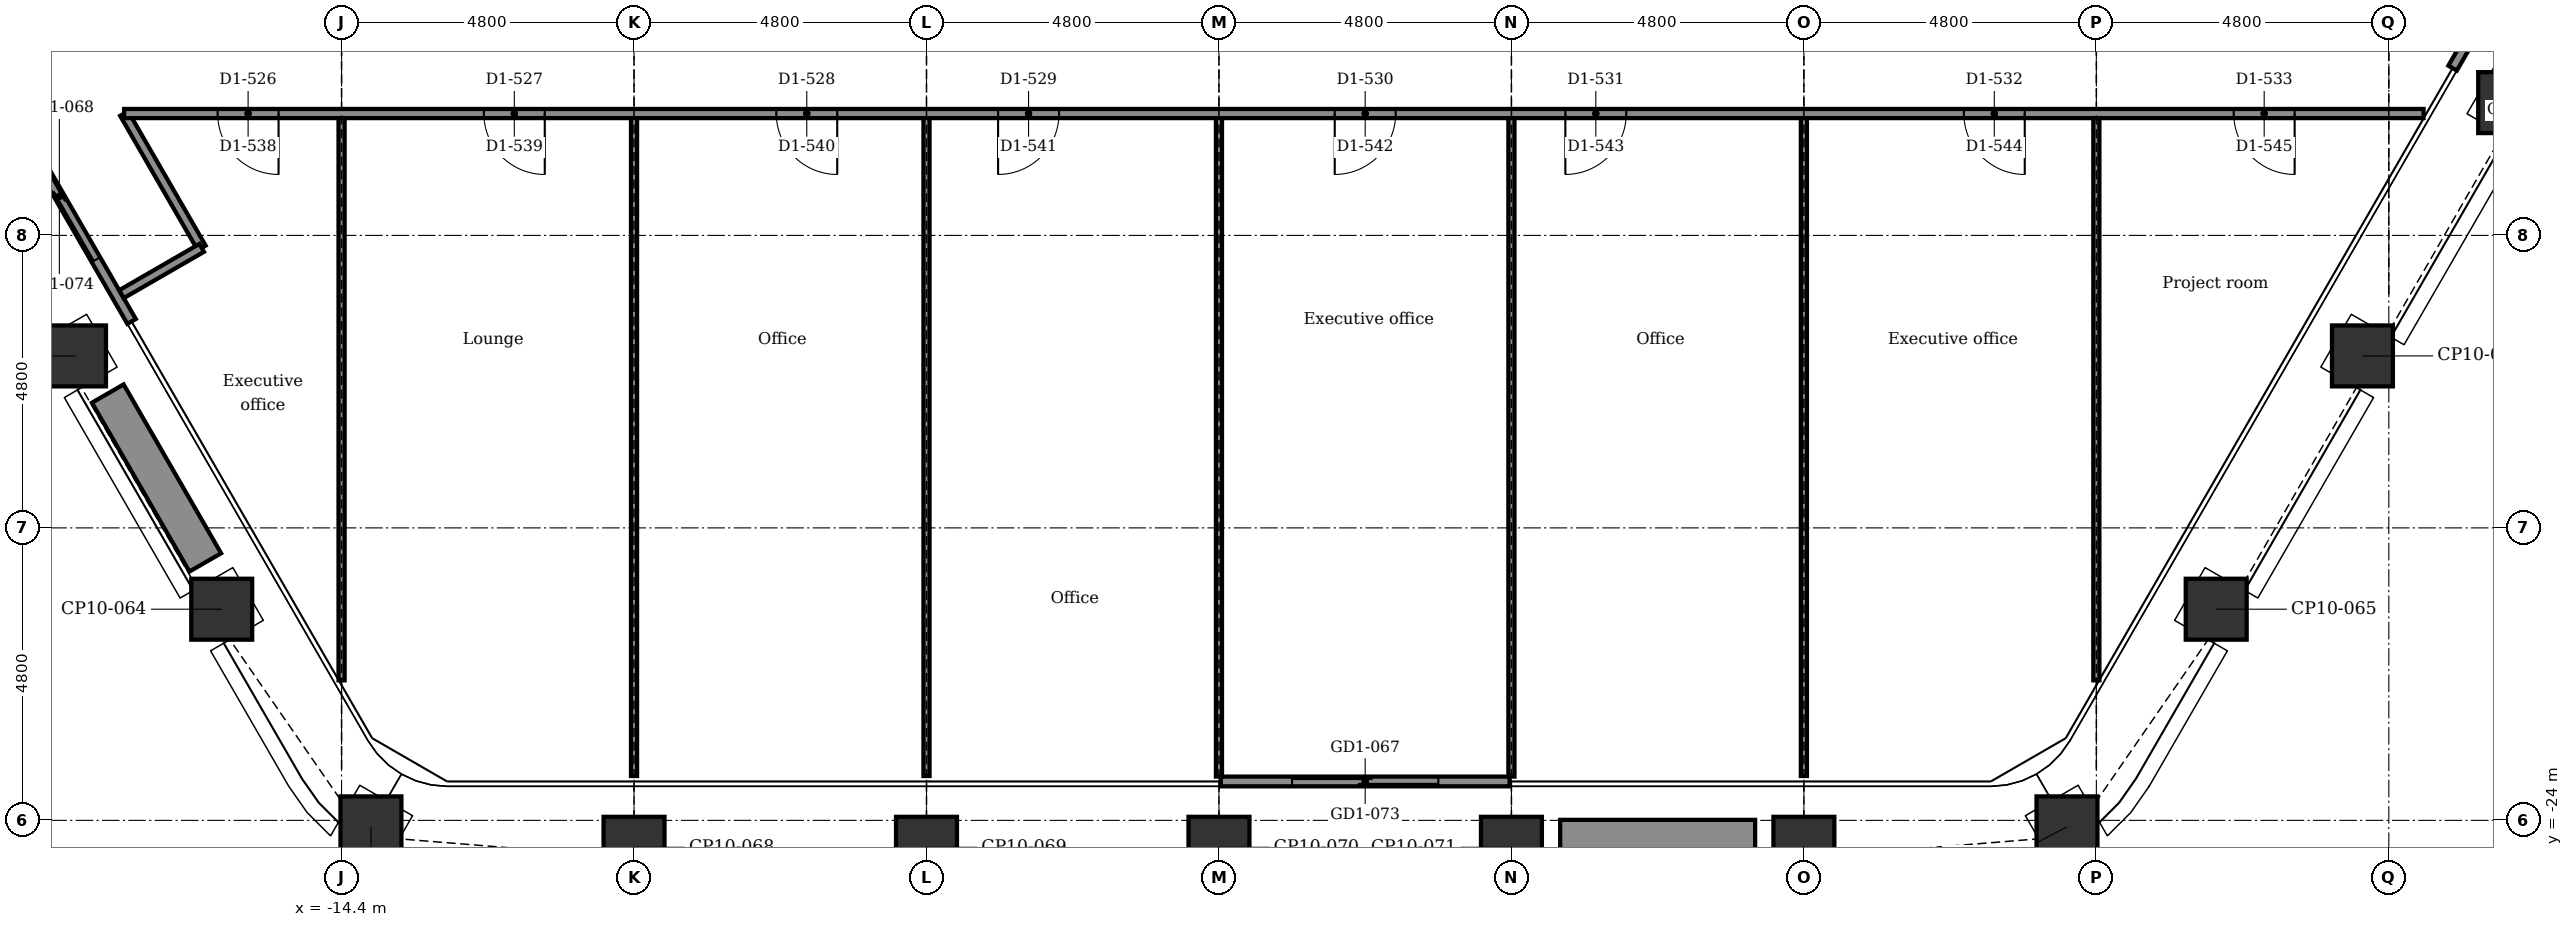
"""IFC4 building model, lengths in metres.
Left out: names, types, materials, properties, quantities, classifications, styles, units other than length and angle.
Written with IfcOpenShell. Run it as: python <this file> out.ifc"""

import sys

from ifc_helpers import new_model, si_unit, direction, frame, frame_2d, origin, origin_2d, place, context, subcontext, project, spatial, rectangle, extrude, element, fill, save


model = new_model("IFC4")
c1 = context("Model", 3, precision=1e-05, world=origin(), true_north=direction((0.0, 1.0)))
c2 = subcontext(c1, "Body", "Model", "MODEL_VIEW")
j1 = project(units=[si_unit("LENGTHUNIT", "METRE"), si_unit("PLANEANGLEUNIT", "RADIAN")], contexts=[c1])
p1 = place(None, origin())
s1 = spatial("IfcSite", under=j1, at=p1, CompositionType="ELEMENT")
p2 = place(p1, origin())
s2 = spatial("IfcBuilding", under=s1, at=p2, CompositionType="ELEMENT")
p3 = place(p2, frame((0.0, 0.0, 185.6)))
s3 = spatial("IfcBuildingStorey", under=s2, at=p3, CompositionType="ELEMENT", Elevation=185.6)
for number, where, z_axis, x_axis in (
    (1, (21.167, -12.221, -0.15), (0.0, 0.0, 1.0), (0.5, 0.866, 0.0)),
    (2, (18.767, -16.378, -0.15), (0.0, 0.0, 1.0), (0.5, 0.866, 0.0)),
    (3, (16.367, -20.535, -0.15), (0.0, 0.0, 1.0), (0.5, 0.866, 0.0)),
    (4, (13.918, -24.107, -0.15), (0.0, 0.0, 1.0), (0.866, 0.5, 0.0)),
    (5, (9.6, -24.442, -0.15), (0.0, 0.0, 1.0), (1.0, 0.0, 0.0)),
    (6, (4.8, -24.442, -0.15), (0.0, 0.0, 1.0), (1.0, 0.0, 0.0)),
    (7, (0.0, -24.442, -0.15), (0.0, 0.0, 1.0), (1.0, 0.0, 0.0)),
    (8, (-4.8, -24.442, -0.15), (0.0, 0.0, 1.0), (1.0, 0.0, 0.0)),
    (9, (-9.6, -24.442, -0.15), (0.0, 0.0, 1.0), (1.0, 0.0, 0.0)),
    (10, (-13.918, -24.107, -0.15), (0.0, 0.0, 1.0), (0.5, 0.866, 0.0)),
    (11, (-16.367, -20.535, -0.15), (0.0, 0.0, 1.0), (0.866, 0.5, 0.0)),
    (12, (-18.767, -16.378, -0.15), (0.0, 0.0, 1.0), (0.866, 0.5, 0.0)),
):
    element("IfcColumn", number, at=place(p3, frame(where, z_axis=z_axis, x_axis=x_axis)), inside=s3, PredefinedType="COLUMN", context=c2, shape_type="SweptSolid", body=[
        extrude(rectangle(XDim=1.0, YDim=1.0, at=origin_2d()), origin(), (0.0, 0.0, 1.0), 3.9),
    ])
p4 = place(p3, frame((22.617, -7.55, 0.0), z_axis=(0.0, 0.0, 1.0), x_axis=(-0.5000167099, -0.866015756104, 0.0)))
e13 = element("IfcWall", 13, at=p4, inside=s3, PredefinedType="PARTITIONING", context=c2, shape_type="SweptSolid", body=[
    extrude(rectangle(XDim=4.74, YDim=0.16, at=frame_2d((2.37, 0.0))), origin(), (0.0, 0.0, 1.0), 3.75),
])
p5 = place(p4, frame((1.17, 0.0, 0.0)))
e14 = element("IfcOpeningElement", 14, at=p5, cuts=e13, PredefinedType="OPENING", context=c2, shape_type="SweptSolid", body=[
    extrude(rectangle(XDim=2.4, YDim=2.4, at=frame_2d((1.2, 1.2))), frame((0.0, 0.09, 0.0), z_axis=(0.0, -1.0, 0.0), x_axis=(1.0, 0.0, 0.0)), (0.0, 0.0, 1.0), 0.18),
])
p6 = place(p3, frame((4.77, -23.362, 0.0), z_axis=(0.0, 0.0, 1.0), x_axis=(-1.0, 0.0, 0.0)))
e15 = element("IfcWall", 15, at=p6, inside=s3, PredefinedType="PARTITIONING", context=c2, shape_type="SweptSolid", body=[
    extrude(rectangle(XDim=4.74, YDim=0.16, at=frame_2d((2.37, 0.0))), origin(), (0.0, 0.0, 1.0), 3.75),
])
p7 = place(p6, frame((1.17, 0.0, 0.0)))
e16 = element("IfcOpeningElement", 16, at=p7, cuts=e15, PredefinedType="OPENING", context=c2, shape_type="SweptSolid", body=[
    extrude(rectangle(XDim=2.4, YDim=2.4, at=frame_2d((1.2, 1.2))), frame((0.0, 0.09, 0.0), z_axis=(0.0, -1.0, 0.0), x_axis=(1.0, 0.0, 0.0)), (0.0, 0.0, 1.0), 0.18),
])
p8 = place(p3, frame((-17.847, -15.812, 0.0), z_axis=(0.0, 0.0, 1.0), x_axis=(-0.5000167099, 0.866015756104, 0.0)))
e17 = element("IfcWall", 17, at=p8, inside=s3, PredefinedType="PARTITIONING", context=c2, shape_type="SweptSolid", body=[
    extrude(rectangle(XDim=4.74, YDim=0.16, at=frame_2d((2.37, 0.0))), origin(), (0.0, 0.0, 1.0), 3.75),
])
p9 = place(p8, frame((1.17, 0.0, 0.0)))
e18 = element("IfcOpeningElement", 18, at=p9, cuts=e17, PredefinedType="OPENING", context=c2, shape_type="SweptSolid", body=[
    extrude(rectangle(XDim=2.4, YDim=2.4, at=frame_2d((1.2, 1.2))), frame((0.0, 0.09, 0.0), z_axis=(0.0, -1.0, 0.0), x_axis=(1.0, 0.0, 0.0)), (0.0, 0.0, 1.0), 0.18),
])
for number, where, z_axis, x_axis in (
    (19, (8.8, -24.292, 0.0), (0.0, 0.0, 1.0), (-1.0, 0.0, 0.0)),
    (20, (-16.637, -19.767, 0.0), (0.0, 0.0, 1.0), (-0.5, 0.866, 0.0)),
):
    element("IfcWall", number, at=place(p3, frame(where, z_axis=z_axis, x_axis=x_axis)), inside=s3, PredefinedType="USERDEFINED", context=c2, shape_type="SweptSolid", body=[
        extrude(rectangle(XDim=3.2, YDim=0.6, at=frame_2d((1.6, 0.0))), origin(), (0.0, 0.0, 1.0), 0.7),
    ])
p10 = place(p3, frame((14.4, -21.701, 0.0), z_axis=(0.0, 0.0, 1.0), x_axis=(0.0, 1.0, 0.0)))
e21 = element("IfcWall", 21, at=p10, inside=s3, PredefinedType="PARTITIONING", context=c2, shape_type="SweptSolid", body=[
    extrude(rectangle(XDim=9.302, YDim=0.1, at=frame_2d((4.651, 0.0))), origin(), (0.0, 0.0, 1.0), 3.066),
])
p11 = place(p3, frame((9.6, -23.271, 0.0), z_axis=(0.0, 0.0, 1.0), x_axis=(0.0, 1.0, 0.0)))
e22 = element("IfcWall", 22, at=p11, inside=s3, PredefinedType="PARTITIONING", context=c2, shape_type="SweptSolid", body=[
    extrude(rectangle(XDim=10.872, YDim=0.1, at=frame_2d((5.436, 0.0))), origin(), (0.0, 0.0, 1.0), 3.066),
])
for number, where, z_axis, x_axis in (
    (23, (4.8, -23.281, 0.0), (0.0, 0.0, 1.0), (0.0, 1.0, 0.0)),
    (24, (0.0, -23.281, 0.0), (0.0, 0.0, 1.0), (0.0, 1.0, 0.0)),
):
    element("IfcWall", number, at=place(p3, frame(where, z_axis=z_axis, x_axis=x_axis)), inside=s3, PredefinedType="PARTITIONING", context=c2, shape_type="SweptSolid", body=[
        extrude(rectangle(XDim=10.882, YDim=0.1, at=frame_2d((5.441, 0.0))), origin(), (0.0, 0.0, 1.0), 3.066),
    ])
for number, where, z_axis, x_axis in (
    (25, (-4.8, -23.271, 0.0), (0.0, 0.0, 1.0), (0.0, 1.0, 0.0)),
    (26, (-9.6, -23.271, 0.0), (0.0, 0.0, 1.0), (0.0, 1.0, 0.0)),
):
    element("IfcWall", number, at=place(p3, frame(where, z_axis=z_axis, x_axis=x_axis)), inside=s3, PredefinedType="PARTITIONING", context=c2, shape_type="SweptSolid", body=[
        extrude(rectangle(XDim=10.872, YDim=0.1, at=frame_2d((5.436, 0.0))), origin(), (0.0, 0.0, 1.0), 3.066),
    ])
p12 = place(p3, frame((-14.4, -21.701, 0.0), z_axis=(0.0, 0.0, 1.0), x_axis=(0.0, 1.0, 0.0)))
e27 = element("IfcWall", 27, at=p12, inside=s3, PredefinedType="PARTITIONING", context=c2, shape_type="SweptSolid", body=[
    extrude(rectangle(XDim=9.302, YDim=0.1, at=frame_2d((4.651, 0.0))), origin(), (0.0, 0.0, 1.0), 3.066),
])
p13 = place(p3, frame((-17.969, -12.4, 0.0), z_axis=(0.0, 0.0, 1.0), x_axis=(0.499996383721, -0.866027491634, 0.0)))
e28 = element("IfcWall", 28, at=p13, inside=s3, PredefinedType="PARTITIONING", context=c2, shape_type="SweptSolid", body=[
    extrude(rectangle(XDim=2.546, YDim=0.15, at=frame_2d((1.273, 0.0))), origin(), (0.0, 0.0, 1.0), 3.75),
])
p14 = place(p3, frame((-18.012, -15.365, 0.0), z_axis=(0.0, 0.0, 1.0), x_axis=(0.866030456496, 0.499991248344, 0.0)))
e29 = element("IfcWall", 29, at=p14, inside=s3, PredefinedType="PARTITIONING", context=c2, shape_type="SweptSolid", body=[
    extrude(rectangle(XDim=1.52, YDim=0.15, at=frame_2d((0.76, 0.0))), origin(), (0.0, 0.0, 1.0), 3.75),
])
p15 = place(p3, frame((-17.969, -12.4, 0.0), z_axis=(0.0, 0.0, 1.0), x_axis=(1.0, 0.0, 0.0)))
e30 = element("IfcWall", 30, at=p15, inside=s3, PredefinedType="PARTITIONING", context=c2, shape_type="SweptSolid", body=[
    extrude(rectangle(XDim=37.739, YDim=0.15, at=frame_2d((18.87, 0.0))), origin(), (0.0, 0.0, 1.0), 3.75),
])
p16 = place(p15, frame((1.535, 0.0, 0.0)))
e31 = element("IfcOpeningElement", 31, at=p16, cuts=e30, PredefinedType="OPENING", context=c2, shape_type="SweptSolid", body=[
    extrude(rectangle(XDim=1.0, YDim=2.1, at=frame_2d((0.5, 1.05))), frame((0.0, 0.085, 0.0), z_axis=(0.0, -1.0, 0.0), x_axis=(1.0, 0.0, 0.0)), (0.0, 0.0, 1.0), 0.17),
])
p17 = place(p15, frame((5.904, 0.0, 0.0)))
e32 = element("IfcOpeningElement", 32, at=p17, cuts=e30, PredefinedType="OPENING", context=c2, shape_type="SweptSolid", body=[
    extrude(rectangle(XDim=1.0, YDim=2.1, at=frame_2d((0.5, 1.05))), frame((0.0, 0.085, 0.0), z_axis=(0.0, -1.0, 0.0), x_axis=(1.0, 0.0, 0.0)), (0.0, 0.0, 1.0), 0.17),
])
p18 = place(p15, frame((10.704, 0.0, 0.0)))
e33 = element("IfcOpeningElement", 33, at=p18, cuts=e30, PredefinedType="OPENING", context=c2, shape_type="SweptSolid", body=[
    extrude(rectangle(XDim=1.0, YDim=2.1, at=frame_2d((0.5, 1.05))), frame((0.0, 0.085, 0.0), z_axis=(0.0, -1.0, 0.0), x_axis=(1.0, 0.0, 0.0)), (0.0, 0.0, 1.0), 0.17),
])
p19 = place(p15, frame((14.344, 0.0, 0.0)))
e34 = element("IfcOpeningElement", 34, at=p19, cuts=e30, PredefinedType="OPENING", context=c2, shape_type="SweptSolid", body=[
    extrude(rectangle(XDim=1.0, YDim=2.1, at=frame_2d((0.5, 1.05))), frame((0.0, 0.085, 0.0), z_axis=(0.0, -1.0, 0.0), x_axis=(1.0, 0.0, 0.0)), (0.0, 0.0, 1.0), 0.17),
])
p20 = place(p15, frame((19.869, 0.0, 0.0)))
e35 = element("IfcOpeningElement", 35, at=p20, cuts=e30, PredefinedType="OPENING", context=c2, shape_type="SweptSolid", body=[
    extrude(rectangle(XDim=1.0, YDim=2.1, at=frame_2d((0.5, 1.05))), frame((0.0, 0.085, 0.0), z_axis=(0.0, -1.0, 0.0), x_axis=(1.0, 0.0, 0.0)), (0.0, 0.0, 1.0), 0.17),
])
p21 = place(p15, frame((23.654, 0.0, 0.0)))
e36 = element("IfcOpeningElement", 36, at=p21, cuts=e30, PredefinedType="OPENING", context=c2, shape_type="SweptSolid", body=[
    extrude(rectangle(XDim=1.0, YDim=2.1, at=frame_2d((0.5, 1.05))), frame((0.0, 0.085, 0.0), z_axis=(0.0, -1.0, 0.0), x_axis=(1.0, 0.0, 0.0)), (0.0, 0.0, 1.0), 0.17),
])
p22 = place(p15, frame((30.194, 0.0, 0.0)))
e37 = element("IfcOpeningElement", 37, at=p22, cuts=e30, PredefinedType="OPENING", context=c2, shape_type="SweptSolid", body=[
    extrude(rectangle(XDim=1.0, YDim=2.1, at=frame_2d((0.5, 1.05))), frame((0.0, 0.085, 0.0), z_axis=(0.0, -1.0, 0.0), x_axis=(1.0, 0.0, 0.0)), (0.0, 0.0, 1.0), 0.17),
])
p23 = place(p15, frame((34.623, 0.0, 0.0)))
e38 = element("IfcOpeningElement", 38, at=p23, cuts=e30, PredefinedType="OPENING", context=c2, shape_type="SweptSolid", body=[
    extrude(rectangle(XDim=1.0, YDim=2.1, at=frame_2d((0.5, 1.05))), frame((0.0, 0.085, 0.0), z_axis=(0.0, -1.0, 0.0), x_axis=(1.0, 0.0, 0.0)), (0.0, 0.0, 1.0), 0.17),
])
p24 = place(p7, origin())
e39 = element("IfcDoor", 39, at=p24, inside=s3, OperationType="DOUBLE_DOOR_SLIDING", PredefinedType="DOOR", context=c2, shape_type="SweptSolid", body=[
    extrude(rectangle(XDim=2.4, YDim=2.4, at=frame_2d((1.2, 1.2))), frame((0.0, 0.025, 0.0), z_axis=(0.0, -1.0, 0.0), x_axis=(1.0, 0.0, 0.0)), (0.0, 0.0, 1.0), 0.05),
])
fill(e16, e39)
p25 = place(p9, origin())
e40 = element("IfcDoor", 40, at=p25, inside=s3, OperationType="DOUBLE_DOOR_SLIDING", PredefinedType="DOOR", context=c2, shape_type="SweptSolid", body=[
    extrude(rectangle(XDim=2.4, YDim=2.4, at=frame_2d((1.2, 1.2))), frame((0.0, 0.025, 0.0), z_axis=(0.0, -1.0, 0.0), x_axis=(1.0, 0.0, 0.0)), (0.0, 0.0, 1.0), 0.05),
])
fill(e18, e40)
p26 = place(p16, frame((1.0, 0.0, 0.0), z_axis=(0.0, 0.0, 1.0), x_axis=(-1.0, 0.0, 0.0)))
e41 = element("IfcDoor", 41, at=p26, inside=s3, OperationType="SINGLE_SWING_RIGHT", PredefinedType="DOOR", context=c2, shape_type="SweptSolid", body=[
    extrude(rectangle(XDim=1.0, YDim=2.1, at=frame_2d((0.5, 1.05))), frame((0.0, 0.025, 0.0), z_axis=(0.0, -1.0, 0.0), x_axis=(1.0, 0.0, 0.0)), (0.0, 0.0, 1.0), 0.05),
])
fill(e31, e41)
p27 = place(p17, frame((1.0, 0.0, 0.0), z_axis=(0.0, 0.0, 1.0), x_axis=(-1.0, 0.0, 0.0)))
e42 = element("IfcDoor", 42, at=p27, inside=s3, OperationType="SINGLE_SWING_RIGHT", PredefinedType="DOOR", context=c2, shape_type="SweptSolid", body=[
    extrude(rectangle(XDim=1.0, YDim=2.1, at=frame_2d((0.5, 1.05))), frame((0.0, 0.025, 0.0), z_axis=(0.0, -1.0, 0.0), x_axis=(1.0, 0.0, 0.0)), (0.0, 0.0, 1.0), 0.05),
])
fill(e32, e42)
p28 = place(p18, frame((1.0, 0.0, 0.0), z_axis=(0.0, 0.0, 1.0), x_axis=(-1.0, 0.0, 0.0)))
e43 = element("IfcDoor", 43, at=p28, inside=s3, OperationType="SINGLE_SWING_RIGHT", PredefinedType="DOOR", context=c2, shape_type="SweptSolid", body=[
    extrude(rectangle(XDim=1.0, YDim=2.1, at=frame_2d((0.5, 1.05))), frame((0.0, 0.025, 0.0), z_axis=(0.0, -1.0, 0.0), x_axis=(1.0, 0.0, 0.0)), (0.0, 0.0, 1.0), 0.05),
])
fill(e33, e43)
p29 = place(p19, frame((1.0, 0.0, 0.0), z_axis=(0.0, 0.0, 1.0), x_axis=(-1.0, 0.0, 0.0)))
e44 = element("IfcDoor", 44, at=p29, inside=s3, OperationType="SINGLE_SWING_LEFT", PredefinedType="DOOR", context=c2, shape_type="SweptSolid", body=[
    extrude(rectangle(XDim=1.0, YDim=2.1, at=frame_2d((0.5, 1.05))), frame((0.0, 0.025, 0.0), z_axis=(0.0, -1.0, 0.0), x_axis=(1.0, 0.0, 0.0)), (0.0, 0.0, 1.0), 0.05),
])
fill(e34, e44)
p30 = place(p20, frame((1.0, 0.0, 0.0), z_axis=(0.0, 0.0, 1.0), x_axis=(-1.0, 0.0, 0.0)))
e45 = element("IfcDoor", 45, at=p30, inside=s3, OperationType="SINGLE_SWING_LEFT", PredefinedType="DOOR", context=c2, shape_type="SweptSolid", body=[
    extrude(rectangle(XDim=1.0, YDim=2.1, at=frame_2d((0.5, 1.05))), frame((0.0, 0.025, 0.0), z_axis=(0.0, -1.0, 0.0), x_axis=(1.0, 0.0, 0.0)), (0.0, 0.0, 1.0), 0.05),
])
fill(e35, e45)
p31 = place(p21, frame((1.0, 0.0, 0.0), z_axis=(0.0, 0.0, 1.0), x_axis=(-1.0, 0.0, 0.0)))
e46 = element("IfcDoor", 46, at=p31, inside=s3, OperationType="SINGLE_SWING_LEFT", PredefinedType="DOOR", context=c2, shape_type="SweptSolid", body=[
    extrude(rectangle(XDim=1.0, YDim=2.1, at=frame_2d((0.5, 1.05))), frame((0.0, 0.025, 0.0), z_axis=(0.0, -1.0, 0.0), x_axis=(1.0, 0.0, 0.0)), (0.0, 0.0, 1.0), 0.05),
])
fill(e36, e46)
p32 = place(p22, frame((1.0, 0.0, 0.0), z_axis=(0.0, 0.0, 1.0), x_axis=(-1.0, 0.0, 0.0)))
e47 = element("IfcDoor", 47, at=p32, inside=s3, OperationType="SINGLE_SWING_RIGHT", PredefinedType="DOOR", context=c2, shape_type="SweptSolid", body=[
    extrude(rectangle(XDim=1.0, YDim=2.1, at=frame_2d((0.5, 1.05))), frame((0.0, 0.025, 0.0), z_axis=(0.0, -1.0, 0.0), x_axis=(1.0, 0.0, 0.0)), (0.0, 0.0, 1.0), 0.05),
])
fill(e37, e47)
p33 = place(p23, frame((1.0, 0.0, 0.0), z_axis=(0.0, 0.0, 1.0), x_axis=(-1.0, 0.0, 0.0)))
e48 = element("IfcDoor", 48, at=p33, inside=s3, OperationType="SINGLE_SWING_RIGHT", PredefinedType="DOOR", context=c2, shape_type="SweptSolid", body=[
    extrude(rectangle(XDim=1.0, YDim=2.1, at=frame_2d((0.5, 1.05))), frame((0.0, 0.025, 0.0), z_axis=(0.0, -1.0, 0.0), x_axis=(1.0, 0.0, 0.0)), (0.0, 0.0, 1.0), 0.05),
])
fill(e38, e48)
save(model, sys.argv[1])
